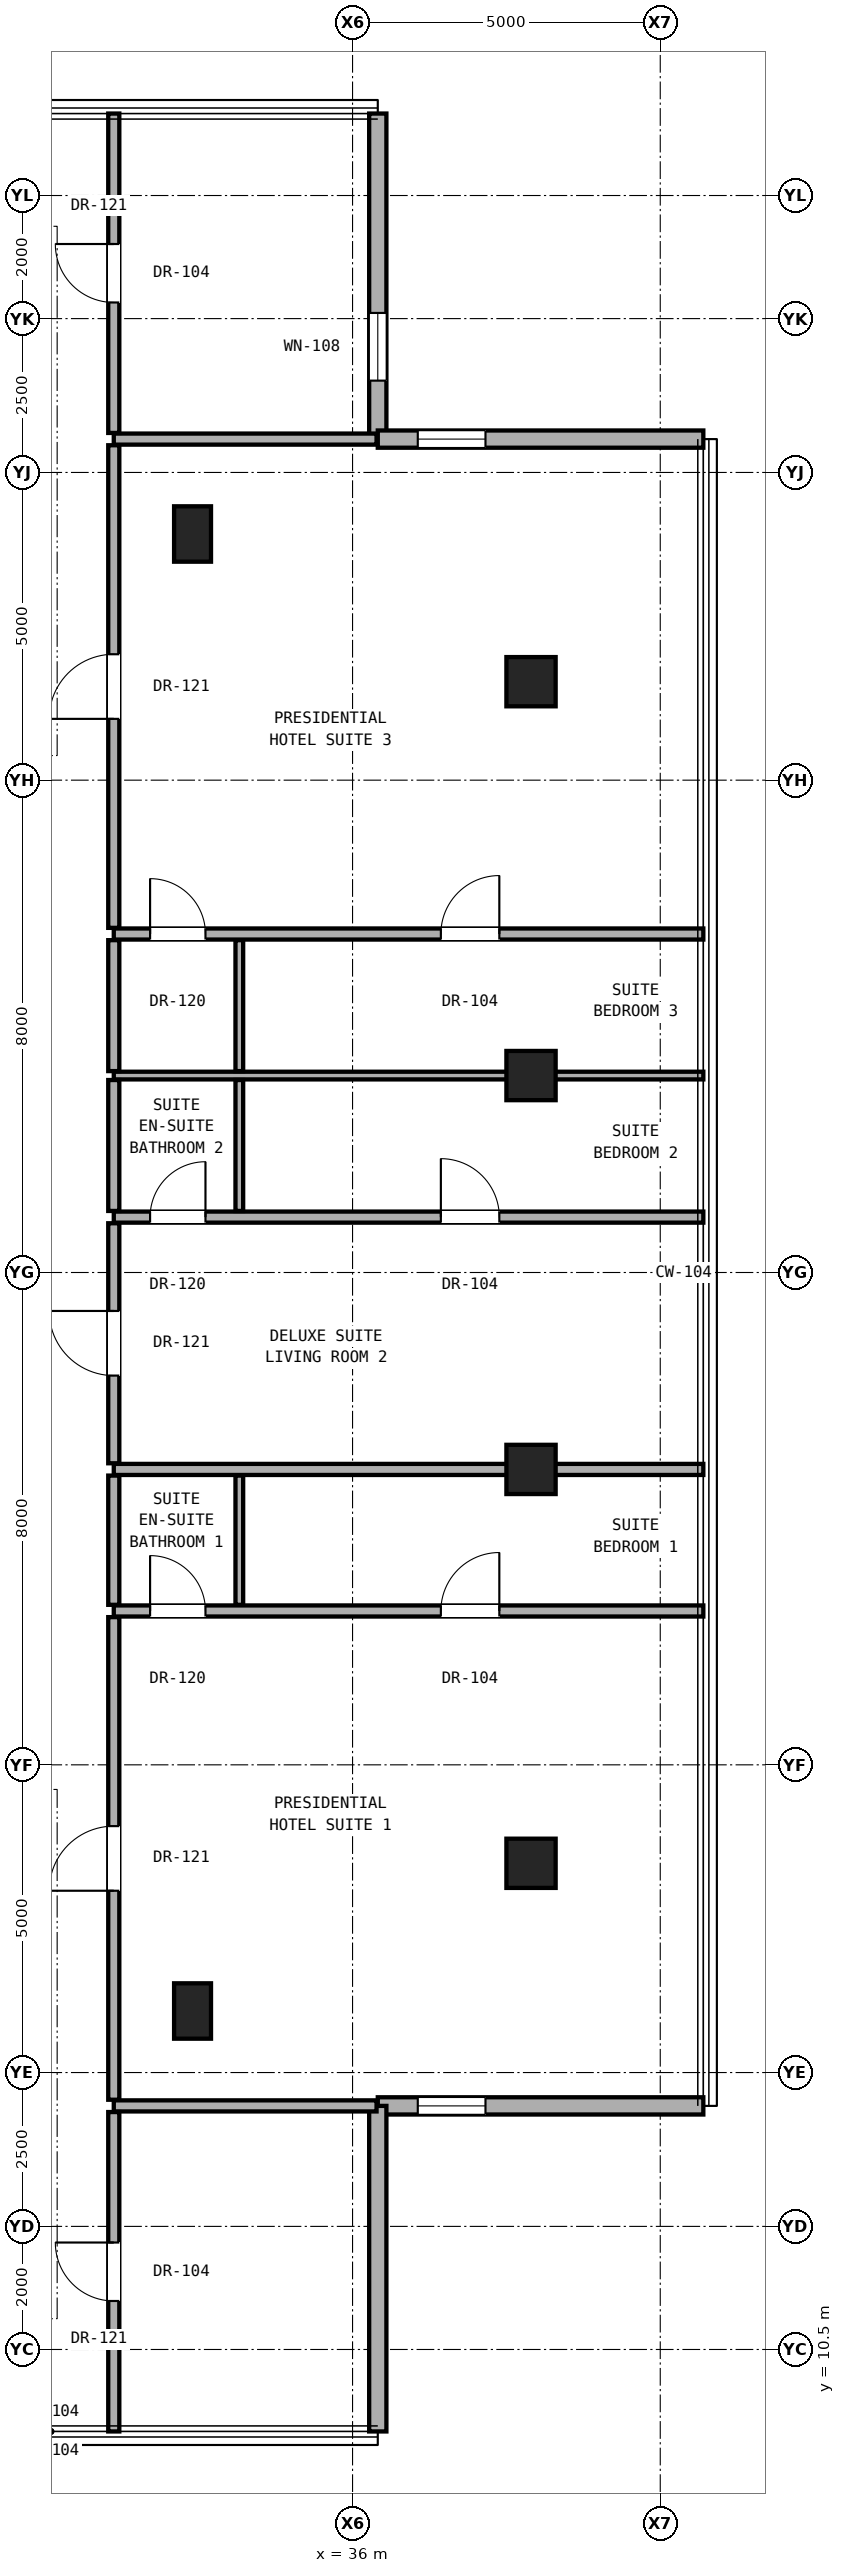
"""IFC4 building model, lengths in metres.
Left out: names, types, materials, properties, quantities, classifications, styles, units other than length and angle.
Written with IfcOpenShell. Run it as: python <this file> out.ifc"""

import sys

from ifc_helpers import new_model, si_unit, direction, frame, frame_2d, origin, origin_2d, place, context, subcontext, project, spatial, rectangle, hollow_rectangle, extrude, element, fill, save


model = new_model("IFC4")
c1 = context("Model", 3, precision=1e-05, world=origin(), true_north=direction((0.0, 1.0)))
c2 = subcontext(c1, "Body", "Model", "MODEL_VIEW")
j1 = project(units=[si_unit("LENGTHUNIT", "METRE"), si_unit("PLANEANGLEUNIT", "RADIAN")], contexts=[c1])
p1 = place(None, origin())
s1 = spatial("IfcSite", under=j1, at=p1, CompositionType="ELEMENT")
p2 = place(p1, origin())
s2 = spatial("IfcBuilding", under=s1, at=p2, CompositionType="ELEMENT")
p3 = place(p2, frame((0.0, 0.0, 232.6)))
s3 = spatial("IfcBuildingStorey", under=s2, at=p3, CompositionType="ELEMENT", Elevation=232.6)
for number, where, z_axis, x_axis in (
    (1, (38.9, 18.4, 0.0), (0.0, 0.0, 1.0), (1.0, 0.0, 0.0)),
    (2, (38.9, 24.8, 0.0), (0.0, 0.0, 1.0), (1.0, 0.0, 0.0)),
    (3, (38.9, 31.2, 0.0), (0.0, 0.0, 1.0), (1.0, 0.0, 0.0)),
    (4, (38.9, 37.6, 0.0), (0.0, 0.0, 1.0), (1.0, 0.0, 0.0)),
):
    element("IfcColumn", number, at=place(p3, frame(where, z_axis=z_axis, x_axis=x_axis)), inside=s3, PredefinedType="COLUMN", context=c2, shape_type="SweptSolid", body=[
        extrude(hollow_rectangle(XDim=0.8, YDim=0.8, WallThickness=0.045, at=origin_2d()), origin(), (0.0, 0.0, 1.0), 3.3),
    ])
for number, where, z_axis, x_axis in (
    (5, (33.4, 16.0, 0.0), (0.0, 0.0, 1.0), (1.0, 0.0, 0.0)),
    (6, (33.4, 40.0, 0.0), (0.0, 0.0, 1.0), (1.0, 0.0, 0.0)),
):
    element("IfcColumn", number, at=place(p3, frame(where, z_axis=z_axis, x_axis=x_axis)), inside=s3, PredefinedType="PILASTER", context=c2, shape_type="SweptSolid", body=[
        extrude(rectangle(XDim=0.6, YDim=0.9, at=origin_2d()), origin(), (0.0, 0.0, 1.0), 3.3),
    ])
p4 = place(p3, frame((36.41, 41.542, 0.0), z_axis=(0.0, 0.0, 1.0), x_axis=(0.0, 1.0, 0.0)))
e7 = element("IfcWall", 7, at=p4, inside=s3, PredefinedType="SOLIDWALL", context=c2, shape_type="SweptSolid", body=[
    extrude(rectangle(XDim=5.29, YDim=0.28, at=frame_2d((2.645, 0.0))), origin(), (0.0, 0.0, 1.0), 3.08),
])
p5 = place(p4, frame((0.95, 0.0, 0.85)))
e8 = element("IfcOpeningElement", 8, at=p5, cuts=e7, PredefinedType="OPENING", context=c2, shape_type="SweptSolid", body=[
    extrude(rectangle(XDim=1.1, YDim=2.0, at=frame_2d((0.55, 1.0))), frame((0.0, 0.15, 0.0), z_axis=(0.0, -1.0, 0.0), x_axis=(1.0, 0.0, 0.0)), (0.0, 0.0, 1.0), 0.3),
])
p6 = place(p3, frame((36.41, 14.458, 0.0), z_axis=(0.0, 0.0, 1.0), x_axis=(1.0, 0.0, 0.0)))
e9 = element("IfcWall", 9, at=p6, inside=s3, PredefinedType="SOLIDWALL", context=c2, shape_type="SweptSolid", body=[
    extrude(rectangle(XDim=5.29, YDim=0.28, at=frame_2d((2.645, 0.0))), origin(), (0.0, 0.0, 1.0), 3.08),
])
p7 = place(p6, frame((0.65, 0.0, 0.85)))
e10 = element("IfcOpeningElement", 10, at=p7, cuts=e9, PredefinedType="OPENING", context=c2, shape_type="SweptSolid", body=[
    extrude(rectangle(XDim=1.1, YDim=2.0, at=frame_2d((0.55, 1.0))), frame((0.0, 0.15, 0.0), z_axis=(0.0, -1.0, 0.0), x_axis=(1.0, 0.0, 0.0)), (0.0, 0.0, 1.0), 0.3),
])
p8 = place(p3, frame((36.41, 9.168, 0.0), z_axis=(0.0, 0.0, 1.0), x_axis=(0.0, 1.0, 0.0)))
e11 = element("IfcWall", 11, at=p8, inside=s3, PredefinedType="SOLIDWALL", context=c2, shape_type="SweptSolid", body=[
    extrude(rectangle(XDim=5.29, YDim=0.28, at=frame_2d((2.645, 0.0))), origin(), (0.0, 0.0, 1.0), 3.08),
])
p9 = place(p3, frame((41.7, 41.542, 0.0), z_axis=(0.0, 0.0, 1.0), x_axis=(-1.0, 0.0, 0.0)))
e12 = element("IfcWall", 12, at=p9, inside=s3, PredefinedType="SOLIDWALL", context=c2, shape_type="SweptSolid", body=[
    extrude(rectangle(XDim=5.29, YDim=0.28, at=frame_2d((2.645, 0.0))), origin(), (0.0, 0.0, 1.0), 3.08),
])
p10 = place(p9, frame((3.54, 0.0, 0.85)))
e13 = element("IfcOpeningElement", 13, at=p10, cuts=e12, PredefinedType="OPENING", context=c2, shape_type="SweptSolid", body=[
    extrude(rectangle(XDim=1.1, YDim=2.0, at=frame_2d((0.55, 1.0))), frame((0.0, 0.15, 0.0), z_axis=(0.0, -1.0, 0.0), x_axis=(1.0, 0.0, 0.0)), (0.0, 0.0, 1.0), 0.3),
])
p11 = place(p3, frame((32.12, 14.458, 0.0), z_axis=(0.0, 0.0, 1.0), x_axis=(1.0, 0.0, 0.0)))
e14 = element("IfcWall", 14, at=p11, inside=s3, PredefinedType="PARTITIONING", context=c2, shape_type="SweptSolid", body=[
    extrude(rectangle(XDim=4.27, YDim=0.18, at=frame_2d((2.135, 0.0))), origin(), (0.0, 0.0, 1.0), 3.1),
])
p12 = place(p3, frame((32.12, 22.5, 0.0), z_axis=(0.0, 0.0, 1.0), x_axis=(1.0, 0.0, 0.0)))
e15 = element("IfcWall", 15, at=p12, inside=s3, PredefinedType="PARTITIONING", context=c2, shape_type="SweptSolid", body=[
    extrude(rectangle(XDim=9.58, YDim=0.18, at=frame_2d((4.79, 0.0))), origin(), (0.0, 0.0, 1.0), 2.319),
])
p13 = place(p12, frame((5.315, 0.0, 0.0)))
e16 = element("IfcOpeningElement", 16, at=p13, cuts=e15, PredefinedType="OPENING", context=c2, shape_type="SweptSolid", body=[
    extrude(rectangle(XDim=0.95, YDim=2.15, at=frame_2d((0.475, 1.075))), frame((0.0, 0.1, 0.0), z_axis=(0.0, -1.0, 0.0), x_axis=(1.0, 0.0, 0.0)), (0.0, 0.0, 1.0), 0.2),
])
p14 = place(p12, frame((0.59, 0.0, 0.0)))
e17 = element("IfcOpeningElement", 17, at=p14, cuts=e15, PredefinedType="OPENING", context=c2, shape_type="SweptSolid", body=[
    extrude(rectangle(XDim=0.9, YDim=2.1, at=frame_2d((0.45, 1.05))), frame((0.0, 0.1, 0.0), z_axis=(0.0, -1.0, 0.0), x_axis=(1.0, 0.0, 0.0)), (0.0, 0.0, 1.0), 0.2),
])
p15 = place(p3, frame((32.12, 24.8, 0.0), z_axis=(0.0, 0.0, 1.0), x_axis=(1.0, 0.0, 0.0)))
e18 = element("IfcWall", 18, at=p15, inside=s3, PredefinedType="PARTITIONING", context=c2, shape_type="SweptSolid", body=[
    extrude(rectangle(XDim=9.58, YDim=0.18, at=frame_2d((4.79, 0.0))), origin(), (0.0, 0.0, 1.0), 2.319),
])
p16 = place(p3, frame((32.12, 28.9, 0.0), z_axis=(0.0, 0.0, 1.0), x_axis=(1.0, 0.0, 0.0)))
e19 = element("IfcWall", 19, at=p16, inside=s3, PredefinedType="PARTITIONING", context=c2, shape_type="SweptSolid", body=[
    extrude(rectangle(XDim=9.58, YDim=0.18, at=frame_2d((4.79, 0.0))), origin(), (0.0, 0.0, 1.0), 2.319),
])
p17 = place(p16, frame((5.315, 0.0, 0.0)))
e20 = element("IfcOpeningElement", 20, at=p17, cuts=e19, PredefinedType="OPENING", context=c2, shape_type="SweptSolid", body=[
    extrude(rectangle(XDim=0.95, YDim=2.15, at=frame_2d((0.475, 1.075))), frame((0.0, 0.1, 0.0), z_axis=(0.0, -1.0, 0.0), x_axis=(1.0, 0.0, 0.0)), (0.0, 0.0, 1.0), 0.2),
])
p18 = place(p16, frame((0.59, 0.0, 0.0)))
e21 = element("IfcOpeningElement", 21, at=p18, cuts=e19, PredefinedType="OPENING", context=c2, shape_type="SweptSolid", body=[
    extrude(rectangle(XDim=0.9, YDim=2.1, at=frame_2d((0.45, 1.05))), frame((0.0, 0.1, 0.0), z_axis=(0.0, -1.0, 0.0), x_axis=(1.0, 0.0, 0.0)), (0.0, 0.0, 1.0), 0.2),
])
p19 = place(p3, frame((32.12, 31.2, 0.0), z_axis=(0.0, 0.0, 1.0), x_axis=(1.0, 0.0, 0.0)))
e22 = element("IfcWall", 22, at=p19, inside=s3, PredefinedType="PARTITIONING", context=c2, shape_type="SweptSolid", body=[
    extrude(rectangle(XDim=9.58, YDim=0.125, at=frame_2d((4.79, 0.0))), origin(), (0.0, 0.0, 1.0), 2.319),
])
p20 = place(p3, frame((32.12, 33.5, 0.0), z_axis=(0.0, 0.0, 1.0), x_axis=(1.0, 0.0, 0.0)))
e23 = element("IfcWall", 23, at=p20, inside=s3, PredefinedType="PARTITIONING", context=c2, shape_type="SweptSolid", body=[
    extrude(rectangle(XDim=9.58, YDim=0.18, at=frame_2d((4.79, 0.0))), origin(), (0.0, 0.0, 1.0), 2.319),
])
p21 = place(p20, frame((5.315, 0.0, 0.0)))
e24 = element("IfcOpeningElement", 24, at=p21, cuts=e23, PredefinedType="OPENING", context=c2, shape_type="SweptSolid", body=[
    extrude(rectangle(XDim=0.95, YDim=2.15, at=frame_2d((0.475, 1.075))), frame((0.0, 0.1, 0.0), z_axis=(0.0, -1.0, 0.0), x_axis=(1.0, 0.0, 0.0)), (0.0, 0.0, 1.0), 0.2),
])
p22 = place(p20, frame((0.59, 0.0, 0.0)))
e25 = element("IfcOpeningElement", 25, at=p22, cuts=e23, PredefinedType="OPENING", context=c2, shape_type="SweptSolid", body=[
    extrude(rectangle(XDim=0.9, YDim=2.1, at=frame_2d((0.45, 1.05))), frame((0.0, 0.1, 0.0), z_axis=(0.0, -1.0, 0.0), x_axis=(1.0, 0.0, 0.0)), (0.0, 0.0, 1.0), 0.2),
])
p23 = place(p3, frame((32.12, 41.542, 0.0), z_axis=(0.0, 0.0, 1.0), x_axis=(1.0, 0.0, 0.0)))
e26 = element("IfcWall", 26, at=p23, inside=s3, PredefinedType="PARTITIONING", context=c2, shape_type="SweptSolid", body=[
    extrude(rectangle(XDim=4.27, YDim=0.18, at=frame_2d((2.135, 0.0))), origin(), (0.0, 0.0, 1.0), 3.1),
])
p24 = place(p3, frame((32.12, 9.168, 0.0), z_axis=(0.0, 0.0, 1.0), x_axis=(0.0, 1.0, 0.0)))
e27 = element("IfcWall", 27, at=p24, inside=s3, PredefinedType="PARTITIONING", context=c2, shape_type="SweptSolid", body=[
    extrude(rectangle(XDim=5.19, YDim=0.18, at=frame_2d((2.595, 0.0))), origin(), (0.0, 0.0, 1.0), 3.1),
])
p25 = place(p24, frame((2.12, 0.0, 0.0)))
e28 = element("IfcOpeningElement", 28, at=p25, cuts=e27, PredefinedType="OPENING", context=c2, shape_type="SweptSolid", body=[
    extrude(rectangle(XDim=0.95, YDim=2.15, at=frame_2d((0.475, 1.075))), frame((0.0, 0.1, 0.0), z_axis=(0.0, -1.0, 0.0), x_axis=(1.0, 0.0, 0.0)), (0.0, 0.0, 1.0), 0.2),
])
p26 = place(p3, frame((32.12, 14.558, 0.0), z_axis=(0.0, 0.0, 1.0), x_axis=(0.0, 1.0, 0.0)))
e29 = element("IfcWall", 29, at=p26, inside=s3, PredefinedType="PARTITIONING", context=c2, shape_type="SweptSolid", body=[
    extrude(rectangle(XDim=7.842, YDim=0.18, at=frame_2d((3.921, 0.0))), origin(), (0.0, 0.0, 1.0), 2.492),
])
p27 = place(p26, frame((3.396, 0.0, 0.0)))
e30 = element("IfcOpeningElement", 30, at=p27, cuts=e29, PredefinedType="OPENING", context=c2, shape_type="SweptSolid", body=[
    extrude(rectangle(XDim=1.05, YDim=2.2, at=frame_2d((0.525, 1.1))), frame((0.0, 0.1, 0.0), z_axis=(0.0, -1.0, 0.0), x_axis=(1.0, 0.0, 0.0)), (0.0, 0.0, 1.0), 0.2),
])
p28 = place(p3, frame((32.12, 22.6, 0.0), z_axis=(0.0, 0.0, 1.0), x_axis=(0.0, 1.0, 0.0)))
e31 = element("IfcWall", 31, at=p28, inside=s3, PredefinedType="PARTITIONING", context=c2, shape_type="SweptSolid", body=[
    extrude(rectangle(XDim=2.1, YDim=0.18, at=frame_2d((1.05, 0.0))), origin(), (0.0, 0.0, 1.0), 2.396),
])
p29 = place(p3, frame((32.12, 24.9, 0.0), z_axis=(0.0, 0.0, 1.0), x_axis=(0.0, 1.0, 0.0)))
e32 = element("IfcWall", 32, at=p29, inside=s3, PredefinedType="PARTITIONING", context=c2, shape_type="SweptSolid", body=[
    extrude(rectangle(XDim=3.9, YDim=0.18, at=frame_2d((1.95, 0.0))), origin(), (0.0, 0.0, 1.0), 2.396),
])
p30 = place(p29, frame((1.425, 0.0, 0.0)))
e33 = element("IfcOpeningElement", 33, at=p30, cuts=e32, PredefinedType="OPENING", context=c2, shape_type="SweptSolid", body=[
    extrude(rectangle(XDim=1.05, YDim=2.2, at=frame_2d((0.525, 1.1))), frame((0.0, 0.1, 0.0), z_axis=(0.0, -1.0, 0.0), x_axis=(1.0, 0.0, 0.0)), (0.0, 0.0, 1.0), 0.2),
])
for number, where, z_axis, x_axis in (
    (34, (32.12, 29.0, 0.0), (0.0, 0.0, 1.0), (0.0, 1.0, 0.0)),
    (35, (32.12, 31.272, 0.0), (0.0, 0.0, 1.0), (0.0, 1.0, 0.0)),
):
    element("IfcWall", number, at=place(p3, frame(where, z_axis=z_axis, x_axis=x_axis)), inside=s3, PredefinedType="PARTITIONING", context=c2, shape_type="SweptSolid", body=[
        extrude(rectangle(XDim=2.127, YDim=0.18, at=frame_2d((1.064, 0.0))), origin(), (0.0, 0.0, 1.0), 2.396),
    ])
p31 = place(p3, frame((32.12, 33.6, 0.0), z_axis=(0.0, 0.0, 1.0), x_axis=(0.0, 1.0, 0.0)))
e36 = element("IfcWall", 36, at=p31, inside=s3, PredefinedType="PARTITIONING", context=c2, shape_type="SweptSolid", body=[
    extrude(rectangle(XDim=7.842, YDim=0.18, at=frame_2d((3.921, 0.0))), origin(), (0.0, 0.0, 1.0), 2.492),
])
p32 = place(p31, frame((3.396, 0.0, 0.0)))
e37 = element("IfcOpeningElement", 37, at=p32, cuts=e36, PredefinedType="OPENING", context=c2, shape_type="SweptSolid", body=[
    extrude(rectangle(XDim=1.05, YDim=2.2, at=frame_2d((0.525, 1.1))), frame((0.0, 0.1, 0.0), z_axis=(0.0, -1.0, 0.0), x_axis=(1.0, 0.0, 0.0)), (0.0, 0.0, 1.0), 0.2),
])
p33 = place(p3, frame((32.12, 41.642, 0.0), z_axis=(0.0, 0.0, 1.0), x_axis=(0.0, 1.0, 0.0)))
e38 = element("IfcWall", 38, at=p33, inside=s3, PredefinedType="PARTITIONING", context=c2, shape_type="SweptSolid", body=[
    extrude(rectangle(XDim=5.19, YDim=0.18, at=frame_2d((2.595, 0.0))), origin(), (0.0, 0.0, 1.0), 3.1),
])
p34 = place(p33, frame((2.12, 0.0, 0.0)))
e39 = element("IfcOpeningElement", 39, at=p34, cuts=e38, PredefinedType="OPENING", context=c2, shape_type="SweptSolid", body=[
    extrude(rectangle(XDim=0.95, YDim=2.15, at=frame_2d((0.475, 1.075))), frame((0.0, 0.1, 0.0), z_axis=(0.0, -1.0, 0.0), x_axis=(1.0, 0.0, 0.0)), (0.0, 0.0, 1.0), 0.2),
])
p35 = place(p3, frame((34.16, 22.6, 0.0), z_axis=(0.0, 0.0, 1.0), x_axis=(0.0, 1.0, 0.0)))
e40 = element("IfcWall", 40, at=p35, inside=s3, PredefinedType="PARTITIONING", context=c2, shape_type="SweptSolid", body=[
    extrude(rectangle(XDim=2.1, YDim=0.125, at=frame_2d((1.05, 0.0))), origin(), (0.0, 0.0, 1.0), 2.396),
])
for number, where, z_axis, x_axis in (
    (41, (34.16, 29.0, 0.0), (0.0, 0.0, 1.0), (0.0, 1.0, 0.0)),
    (42, (34.16, 31.272, 0.0), (0.0, 0.0, 1.0), (0.0, 1.0, 0.0)),
):
    element("IfcWall", number, at=place(p3, frame(where, z_axis=z_axis, x_axis=x_axis)), inside=s3, PredefinedType="PARTITIONING", context=c2, shape_type="SweptSolid", body=[
        extrude(rectangle(XDim=2.127, YDim=0.125, at=frame_2d((1.064, 0.0))), origin(), (0.0, 0.0, 1.0), 2.396),
    ])
p36 = place(p5, origin())
e43 = element("IfcWindow", 43, at=p36, inside=s3, PartitioningType="SINGLE_PANEL", PredefinedType="WINDOW", context=c2, shape_type="SweptSolid", body=[
    extrude(rectangle(XDim=1.1, YDim=2.0, at=frame_2d((0.55, 1.0))), frame((0.0, 0.03, 0.0), z_axis=(0.0, -1.0, 0.0), x_axis=(1.0, 0.0, 0.0)), (0.0, 0.0, 1.0), 0.06),
])
fill(e8, e43)
p37 = place(p7, origin())
e44 = element("IfcWindow", 44, at=p37, inside=s3, PartitioningType="SINGLE_PANEL", PredefinedType="WINDOW", context=c2, shape_type="SweptSolid", body=[
    extrude(rectangle(XDim=1.1, YDim=2.0, at=frame_2d((0.55, 1.0))), frame((0.0, 0.03, 0.0), z_axis=(0.0, -1.0, 0.0), x_axis=(1.0, 0.0, 0.0)), (0.0, 0.0, 1.0), 0.06),
])
fill(e10, e44)
p38 = place(p10, origin())
e45 = element("IfcWindow", 45, at=p38, inside=s3, PartitioningType="SINGLE_PANEL", PredefinedType="WINDOW", context=c2, shape_type="SweptSolid", body=[
    extrude(rectangle(XDim=1.1, YDim=2.0, at=frame_2d((0.55, 1.0))), frame((0.0, 0.03, 0.0), z_axis=(0.0, -1.0, 0.0), x_axis=(1.0, 0.0, 0.0)), (0.0, 0.0, 1.0), 0.06),
])
fill(e13, e45)
p39 = place(p27, origin())
e46 = element("IfcDoor", 46, at=p39, inside=s3, OperationType="SINGLE_SWING_LEFT", PredefinedType="DOOR", context=c2, shape_type="SweptSolid", body=[
    extrude(rectangle(XDim=1.05, YDim=2.2, at=frame_2d((0.525, 1.1))), frame((0.0, 0.025, 0.0), z_axis=(0.0, -1.0, 0.0), x_axis=(1.0, 0.0, 0.0)), (0.0, 0.0, 1.0), 0.05),
])
fill(e30, e46)
p40 = place(p13, origin())
e47 = element("IfcDoor", 47, at=p40, inside=s3, OperationType="SINGLE_SWING_RIGHT", PredefinedType="DOOR", context=c2, shape_type="SweptSolid", body=[
    extrude(rectangle(XDim=0.95, YDim=2.15, at=frame_2d((0.475, 1.075))), frame((0.0, 0.025, 0.0), z_axis=(0.0, -1.0, 0.0), x_axis=(1.0, 0.0, 0.0)), (0.0, 0.0, 1.0), 0.05),
])
fill(e16, e47)
p41 = place(p14, origin())
e48 = element("IfcDoor", 48, at=p41, inside=s3, OperationType="SINGLE_SWING_LEFT", PredefinedType="DOOR", context=c2, shape_type="SweptSolid", body=[
    extrude(rectangle(XDim=0.9, YDim=2.1, at=frame_2d((0.45, 1.05))), frame((0.0, 0.025, 0.0), z_axis=(0.0, -1.0, 0.0), x_axis=(1.0, 0.0, 0.0)), (0.0, 0.0, 1.0), 0.05),
])
fill(e17, e48)
p42 = place(p30, origin())
e49 = element("IfcDoor", 49, at=p42, inside=s3, OperationType="SINGLE_SWING_RIGHT", PredefinedType="DOOR", context=c2, shape_type="SweptSolid", body=[
    extrude(rectangle(XDim=1.05, YDim=2.2, at=frame_2d((0.525, 1.1))), frame((0.0, 0.025, 0.0), z_axis=(0.0, -1.0, 0.0), x_axis=(1.0, 0.0, 0.0)), (0.0, 0.0, 1.0), 0.05),
])
fill(e33, e49)
p43 = place(p17, origin())
e50 = element("IfcDoor", 50, at=p43, inside=s3, OperationType="SINGLE_SWING_LEFT", PredefinedType="DOOR", context=c2, shape_type="SweptSolid", body=[
    extrude(rectangle(XDim=0.95, YDim=2.15, at=frame_2d((0.475, 1.075))), frame((0.0, 0.025, 0.0), z_axis=(0.0, -1.0, 0.0), x_axis=(1.0, 0.0, 0.0)), (0.0, 0.0, 1.0), 0.05),
])
fill(e20, e50)
p44 = place(p18, origin())
e51 = element("IfcDoor", 51, at=p44, inside=s3, OperationType="SINGLE_SWING_RIGHT", PredefinedType="DOOR", context=c2, shape_type="SweptSolid", body=[
    extrude(rectangle(XDim=0.9, YDim=2.1, at=frame_2d((0.45, 1.05))), frame((0.0, 0.025, 0.0), z_axis=(0.0, -1.0, 0.0), x_axis=(1.0, 0.0, 0.0)), (0.0, 0.0, 1.0), 0.05),
])
fill(e21, e51)
p45 = place(p32, origin())
e52 = element("IfcDoor", 52, at=p45, inside=s3, OperationType="SINGLE_SWING_LEFT", PredefinedType="DOOR", context=c2, shape_type="SweptSolid", body=[
    extrude(rectangle(XDim=1.05, YDim=2.2, at=frame_2d((0.525, 1.1))), frame((0.0, 0.025, 0.0), z_axis=(0.0, -1.0, 0.0), x_axis=(1.0, 0.0, 0.0)), (0.0, 0.0, 1.0), 0.05),
])
fill(e37, e52)
p46 = place(p21, origin())
e53 = element("IfcDoor", 53, at=p46, inside=s3, OperationType="SINGLE_SWING_RIGHT", PredefinedType="DOOR", context=c2, shape_type="SweptSolid", body=[
    extrude(rectangle(XDim=0.95, YDim=2.15, at=frame_2d((0.475, 1.075))), frame((0.0, 0.025, 0.0), z_axis=(0.0, -1.0, 0.0), x_axis=(1.0, 0.0, 0.0)), (0.0, 0.0, 1.0), 0.05),
])
fill(e24, e53)
p47 = place(p22, origin())
e54 = element("IfcDoor", 54, at=p47, inside=s3, OperationType="SINGLE_SWING_LEFT", PredefinedType="DOOR", context=c2, shape_type="SweptSolid", body=[
    extrude(rectangle(XDim=0.9, YDim=2.1, at=frame_2d((0.45, 1.05))), frame((0.0, 0.025, 0.0), z_axis=(0.0, -1.0, 0.0), x_axis=(1.0, 0.0, 0.0)), (0.0, 0.0, 1.0), 0.05),
])
fill(e25, e54)
p48 = place(p25, origin())
e55 = element("IfcDoor", 55, at=p48, inside=s3, OperationType="SINGLE_SWING_RIGHT", PredefinedType="DOOR", context=c2, shape_type="SweptSolid", body=[
    extrude(rectangle(XDim=0.95, YDim=2.15, at=frame_2d((0.475, 1.075))), frame((0.0, 0.025, 0.0), z_axis=(0.0, -1.0, 0.0), x_axis=(1.0, 0.0, 0.0)), (0.0, 0.0, 1.0), 0.05),
])
fill(e28, e55)
p49 = place(p34, origin())
e56 = element("IfcDoor", 56, at=p49, inside=s3, OperationType="SINGLE_SWING_RIGHT", PredefinedType="DOOR", context=c2, shape_type="SweptSolid", body=[
    extrude(rectangle(XDim=0.95, YDim=2.15, at=frame_2d((0.475, 1.075))), frame((0.0, 0.025, 0.0), z_axis=(0.0, -1.0, 0.0), x_axis=(1.0, 0.0, 0.0)), (0.0, 0.0, 1.0), 0.05),
])
fill(e39, e56)
save(model, sys.argv[1])
